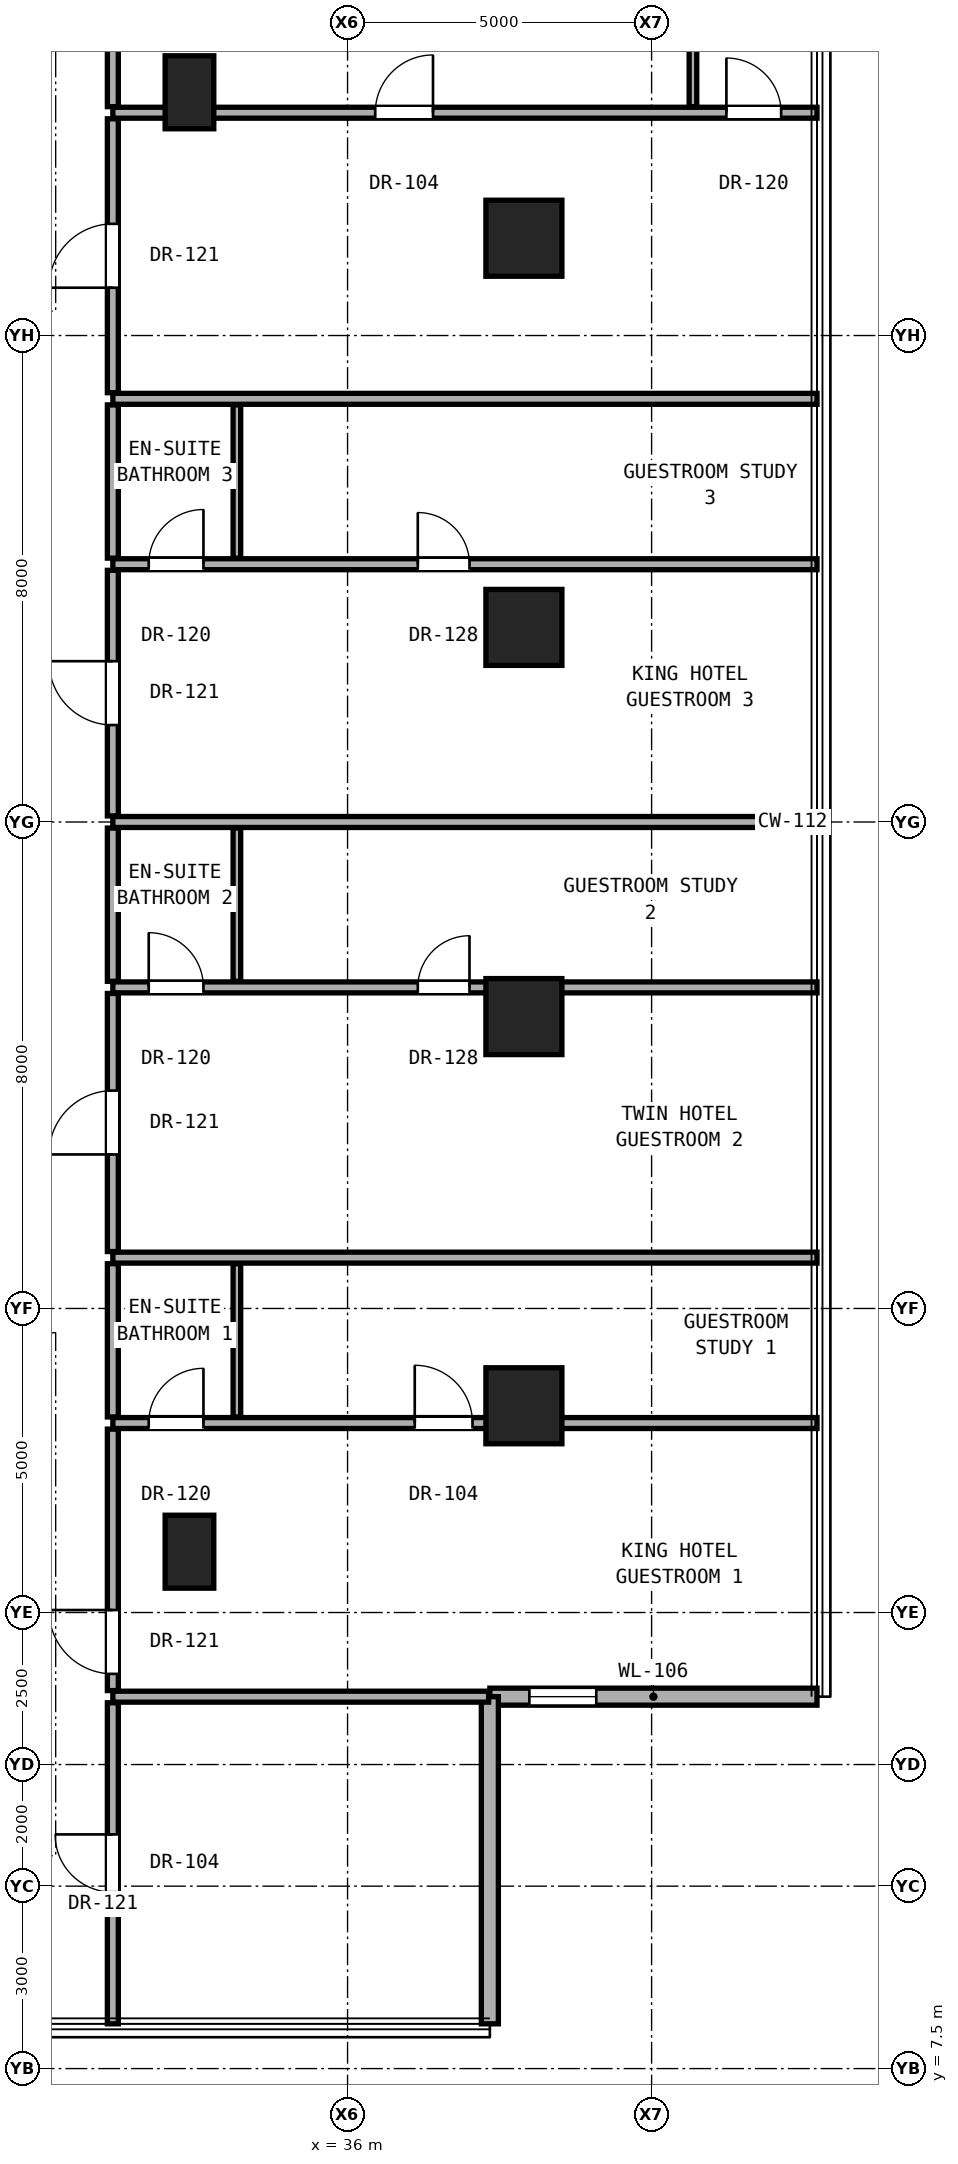
"""IFC4 building model, lengths in metres.
Left out: names, types, materials, properties, quantities, classifications, styles, units other than length and angle.
Written with IfcOpenShell. Run it as: python <this file> out.ifc"""

import sys

from ifc_helpers import new_model, si_unit, direction, frame, frame_2d, origin, origin_2d, place, context, subcontext, project, spatial, rectangle, hollow_rectangle, extrude, element, fill, save


model = new_model("IFC4")
c1 = context("Model", 3, precision=1e-05, world=origin(), true_north=direction((0.0, 1.0)))
c2 = subcontext(c1, "Body", "Model", "MODEL_VIEW")
j1 = project(units=[si_unit("LENGTHUNIT", "METRE"), si_unit("PLANEANGLEUNIT", "RADIAN")], contexts=[c1])
p1 = place(None, origin())
s1 = spatial("IfcSite", under=j1, at=p1, CompositionType="ELEMENT")
p2 = place(p1, origin())
s2 = spatial("IfcBuilding", under=s1, at=p2, CompositionType="ELEMENT")
p3 = place(p2, frame((0.0, 0.0, 48.8)))
s3 = spatial("IfcBuildingStorey", under=s2, at=p3, CompositionType="ELEMENT", Elevation=48.8)
for number, where, z_axis, x_axis in (
    (1, (38.9, 18.4, 0.0), (0.0, 0.0, 1.0), (1.0, 0.0, 0.0)),
    (2, (38.9, 24.8, 0.0), (0.0, 0.0, 1.0), (1.0, 0.0, 0.0)),
    (3, (38.9, 31.2, 0.0), (0.0, 0.0, 1.0), (1.0, 0.0, 0.0)),
    (4, (38.9, 37.6, 0.0), (0.0, 0.0, 1.0), (1.0, 0.0, 0.0)),
):
    element("IfcColumn", number, at=place(p3, frame(where, z_axis=z_axis, x_axis=x_axis)), inside=s3, PredefinedType="COLUMN", context=c2, shape_type="SweptSolid", body=[
        extrude(hollow_rectangle(XDim=1.25, YDim=1.25, WallThickness=0.07, at=origin_2d()), origin(), (0.0, 0.0, 1.0), 3.3),
    ])
for number, where, z_axis, x_axis in (
    (5, (33.4, 16.0, 0.0), (0.0, 0.0, 1.0), (1.0, 0.0, 0.0)),
    (6, (33.4, 40.0, 0.0), (0.0, 0.0, 1.0), (1.0, 0.0, 0.0)),
):
    element("IfcColumn", number, at=place(p3, frame(where, z_axis=z_axis, x_axis=x_axis)), inside=s3, PredefinedType="PILASTER", context=c2, shape_type="SweptSolid", body=[
        extrude(rectangle(XDim=0.8, YDim=1.2, at=origin_2d()), origin(), (0.0, 0.0, 1.0), 3.3),
    ])
p4 = place(p3, frame((38.34, 13.616, 0.0), z_axis=(0.0, 0.0, 1.0), x_axis=(1.0, 0.0, 0.0)))
e7 = element("IfcWall", 7, at=p4, inside=s3, PredefinedType="SOLIDWALL", context=c2, shape_type="SweptSolid", body=[
    extrude(rectangle(XDim=5.38, YDim=0.28, at=frame_2d((2.69, 0.0))), origin(), (0.0, 0.0, 1.0), 3.04),
])
p5 = place(p4, frame((0.65, 0.0, 0.85)))
e8 = element("IfcOpeningElement", 8, at=p5, cuts=e7, PredefinedType="OPENING", context=c2, shape_type="SweptSolid", body=[
    extrude(rectangle(XDim=1.1, YDim=2.0, at=frame_2d((0.55, 1.0))), frame((0.0, 0.15, 0.0), z_axis=(0.0, -1.0, 0.0), x_axis=(1.0, 0.0, 0.0)), (0.0, 0.0, 1.0), 0.3),
])
p6 = place(p3, frame((38.34, 8.236, 0.0), z_axis=(0.0, 0.0, 1.0), x_axis=(0.0, 1.0, 0.0)))
e9 = element("IfcWall", 9, at=p6, inside=s3, PredefinedType="SOLIDWALL", context=c2, shape_type="SweptSolid", body=[
    extrude(rectangle(XDim=5.38, YDim=0.28, at=frame_2d((2.69, 0.0))), origin(), (0.0, 0.0, 1.0), 3.04),
])
p7 = place(p3, frame((32.14, 13.616, 0.0), z_axis=(0.0, 0.0, 1.0), x_axis=(1.0, 0.0, 0.0)))
e10 = element("IfcWall", 10, at=p7, inside=s3, PredefinedType="PARTITIONING", context=c2, shape_type="SweptSolid", body=[
    extrude(rectangle(XDim=6.18, YDim=0.18, at=frame_2d((3.09, 0.0))), origin(), (0.0, 0.0, 1.0), 3.06),
])
p8 = place(p3, frame((32.14, 18.116, 0.0), z_axis=(0.0, 0.0, 1.0), x_axis=(1.0, 0.0, 0.0)))
e11 = element("IfcWall", 11, at=p8, inside=s3, PredefinedType="PARTITIONING", context=c2, shape_type="SweptSolid", body=[
    extrude(rectangle(XDim=11.58, YDim=0.18, at=frame_2d((5.79, 0.0))), origin(), (0.0, 0.0, 1.0), 2.436),
])
p9 = place(p8, frame((4.965, 0.0, 0.0)))
e12 = element("IfcOpeningElement", 12, at=p9, cuts=e11, PredefinedType="OPENING", context=c2, shape_type="SweptSolid", body=[
    extrude(rectangle(XDim=0.95, YDim=2.15, at=frame_2d((0.475, 1.075))), frame((0.0, 0.1, 0.0), z_axis=(0.0, -1.0, 0.0), x_axis=(1.0, 0.0, 0.0)), (0.0, 0.0, 1.0), 0.2),
])
p10 = place(p8, frame((0.59, 0.0, 0.0)))
e13 = element("IfcOpeningElement", 13, at=p10, cuts=e11, PredefinedType="OPENING", context=c2, shape_type="SweptSolid", body=[
    extrude(rectangle(XDim=0.9, YDim=2.1, at=frame_2d((0.45, 1.05))), frame((0.0, 0.1, 0.0), z_axis=(0.0, -1.0, 0.0), x_axis=(1.0, 0.0, 0.0)), (0.0, 0.0, 1.0), 0.2),
])
p11 = place(p3, frame((32.14, 20.836, 0.0), z_axis=(0.0, 0.0, 1.0), x_axis=(1.0, 0.0, 0.0)))
e14 = element("IfcWall", 14, at=p11, inside=s3, PredefinedType="PARTITIONING", context=c2, shape_type="SweptSolid", body=[
    extrude(rectangle(XDim=11.58, YDim=0.18, at=frame_2d((5.79, 0.0))), origin(), (0.0, 0.0, 1.0), 2.125),
])
p12 = place(p3, frame((32.14, 25.28, 0.0), z_axis=(0.0, 0.0, 1.0), x_axis=(1.0, 0.0, 0.0)))
e15 = element("IfcWall", 15, at=p12, inside=s3, PredefinedType="PARTITIONING", context=c2, shape_type="SweptSolid", body=[
    extrude(rectangle(XDim=11.58, YDim=0.18, at=frame_2d((5.79, 0.0))), origin(), (0.0, 0.0, 1.0), 2.125),
])
p13 = place(p12, frame((5.015, 0.0, 0.0)))
e16 = element("IfcOpeningElement", 16, at=p13, cuts=e15, PredefinedType="OPENING", context=c2, shape_type="SweptSolid", body=[
    extrude(rectangle(XDim=0.85, YDim=2.01, at=frame_2d((0.425, 1.005))), frame((0.0, 0.1, 0.0), z_axis=(0.0, -1.0, 0.0), x_axis=(1.0, 0.0, 0.0)), (0.0, 0.0, 1.0), 0.2),
])
p14 = place(p12, frame((0.59, 0.0, 0.0)))
e17 = element("IfcOpeningElement", 17, at=p14, cuts=e15, PredefinedType="OPENING", context=c2, shape_type="SweptSolid", body=[
    extrude(rectangle(XDim=0.9, YDim=2.1, at=frame_2d((0.45, 1.05))), frame((0.0, 0.1, 0.0), z_axis=(0.0, -1.0, 0.0), x_axis=(1.0, 0.0, 0.0)), (0.0, 0.0, 1.0), 0.2),
])
p15 = place(p3, frame((32.14, 28.0, 0.0), z_axis=(0.0, 0.0, 1.0), x_axis=(1.0, 0.0, 0.0)))
e18 = element("IfcWall", 18, at=p15, inside=s3, PredefinedType="PARTITIONING", context=c2, shape_type="SweptSolid", body=[
    extrude(rectangle(XDim=11.58, YDim=0.18, at=frame_2d((5.79, 0.0))), origin(), (0.0, 0.0, 1.0), 2.125),
])
p16 = place(p3, frame((32.14, 32.239, 0.0), z_axis=(0.0, 0.0, 1.0), x_axis=(1.0, 0.0, 0.0)))
e19 = element("IfcWall", 19, at=p16, inside=s3, PredefinedType="PARTITIONING", context=c2, shape_type="SweptSolid", body=[
    extrude(rectangle(XDim=11.58, YDim=0.18, at=frame_2d((5.79, 0.0))), origin(), (0.0, 0.0, 1.0), 2.125),
])
p17 = place(p16, frame((5.015, 0.0, 0.0)))
e20 = element("IfcOpeningElement", 20, at=p17, cuts=e19, PredefinedType="OPENING", context=c2, shape_type="SweptSolid", body=[
    extrude(rectangle(XDim=0.85, YDim=2.01, at=frame_2d((0.425, 1.005))), frame((0.0, 0.1, 0.0), z_axis=(0.0, -1.0, 0.0), x_axis=(1.0, 0.0, 0.0)), (0.0, 0.0, 1.0), 0.2),
])
p18 = place(p16, frame((0.59, 0.0, 0.0)))
e21 = element("IfcOpeningElement", 21, at=p18, cuts=e19, PredefinedType="OPENING", context=c2, shape_type="SweptSolid", body=[
    extrude(rectangle(XDim=0.9, YDim=2.1, at=frame_2d((0.45, 1.05))), frame((0.0, 0.1, 0.0), z_axis=(0.0, -1.0, 0.0), x_axis=(1.0, 0.0, 0.0)), (0.0, 0.0, 1.0), 0.2),
])
p19 = place(p3, frame((32.14, 34.959, 0.0), z_axis=(0.0, 0.0, 1.0), x_axis=(1.0, 0.0, 0.0)))
e22 = element("IfcWall", 22, at=p19, inside=s3, PredefinedType="PARTITIONING", context=c2, shape_type="SweptSolid", body=[
    extrude(rectangle(XDim=11.58, YDim=0.18, at=frame_2d((5.79, 0.0))), origin(), (0.0, 0.0, 1.0), 2.125),
])
p20 = place(p3, frame((32.14, 39.664, 0.0), z_axis=(0.0, 0.0, 1.0), x_axis=(1.0, 0.0, 0.0)))
e23 = element("IfcWall", 23, at=p20, inside=s3, PredefinedType="PARTITIONING", context=c2, shape_type="SweptSolid", body=[
    extrude(rectangle(XDim=11.58, YDim=0.18, at=frame_2d((5.79, 0.0))), origin(), (0.0, 0.0, 1.0), 2.436),
])
p21 = place(p20, frame((4.315, 0.0, 0.0)))
e24 = element("IfcOpeningElement", 24, at=p21, cuts=e23, PredefinedType="OPENING", context=c2, shape_type="SweptSolid", body=[
    extrude(rectangle(XDim=0.95, YDim=2.15, at=frame_2d((0.475, 1.075))), frame((0.0, 0.1, 0.0), z_axis=(0.0, -1.0, 0.0), x_axis=(1.0, 0.0, 0.0)), (0.0, 0.0, 1.0), 0.2),
])
p22 = place(p20, frame((10.09, 0.0, 0.0)))
e25 = element("IfcOpeningElement", 25, at=p22, cuts=e23, PredefinedType="OPENING", context=c2, shape_type="SweptSolid", body=[
    extrude(rectangle(XDim=0.9, YDim=2.1, at=frame_2d((0.45, 1.05))), frame((0.0, 0.1, 0.0), z_axis=(0.0, -1.0, 0.0), x_axis=(1.0, 0.0, 0.0)), (0.0, 0.0, 1.0), 0.2),
])
p23 = place(p3, frame((32.14, 8.236, 0.0), z_axis=(0.0, 0.0, 1.0), x_axis=(0.0, 1.0, 0.0)))
e26 = element("IfcWall", 26, at=p23, inside=s3, PredefinedType="PARTITIONING", context=c2, shape_type="SweptSolid", body=[
    extrude(rectangle(XDim=5.28, YDim=0.18, at=frame_2d((2.64, 0.0))), origin(), (0.0, 0.0, 1.0), 3.06),
])
p24 = place(p23, frame((2.165, 0.0, 0.0)))
e27 = element("IfcOpeningElement", 27, at=p24, cuts=e26, PredefinedType="OPENING", context=c2, shape_type="SweptSolid", body=[
    extrude(rectangle(XDim=0.95, YDim=2.15, at=frame_2d((0.475, 1.075))), frame((0.0, 0.1, 0.0), z_axis=(0.0, -1.0, 0.0), x_axis=(1.0, 0.0, 0.0)), (0.0, 0.0, 1.0), 0.2),
])
p25 = place(p3, frame((32.14, 13.716, 0.0), z_axis=(0.0, 0.0, 1.0), x_axis=(0.0, 1.0, 0.0)))
e28 = element("IfcWall", 28, at=p25, inside=s3, PredefinedType="PARTITIONING", context=c2, shape_type="SweptSolid", body=[
    extrude(rectangle(XDim=4.3, YDim=0.18, at=frame_2d((2.15, 0.0))), origin(), (0.0, 0.0, 1.0), 2.436),
])
p26 = place(p25, frame((0.275, 0.0, 0.0)))
e29 = element("IfcOpeningElement", 29, at=p26, cuts=e28, PredefinedType="OPENING", context=c2, shape_type="SweptSolid", body=[
    extrude(rectangle(XDim=1.05, YDim=2.2, at=frame_2d((0.525, 1.1))), frame((0.0, 0.1, 0.0), z_axis=(0.0, -1.0, 0.0), x_axis=(1.0, 0.0, 0.0)), (0.0, 0.0, 1.0), 0.2),
])
p27 = place(p3, frame((32.14, 18.216, 0.0), z_axis=(0.0, 0.0, 1.0), x_axis=(0.0, 1.0, 0.0)))
e30 = element("IfcWall", 30, at=p27, inside=s3, PredefinedType="PARTITIONING", context=c2, shape_type="SweptSolid", body=[
    extrude(rectangle(XDim=2.52, YDim=0.18, at=frame_2d((1.26, 0.0))), origin(), (0.0, 0.0, 1.0), 2.452),
])
p28 = place(p3, frame((32.14, 20.936, 0.0), z_axis=(0.0, 0.0, 1.0), x_axis=(0.0, 1.0, 0.0)))
e31 = element("IfcWall", 31, at=p28, inside=s3, PredefinedType="PARTITIONING", context=c2, shape_type="SweptSolid", body=[
    extrude(rectangle(XDim=4.244, YDim=0.18, at=frame_2d((2.122, 0.0))), origin(), (0.0, 0.0, 1.0), 2.279),
])
p29 = place(p28, frame((1.597, 0.0, 0.0)))
e32 = element("IfcOpeningElement", 32, at=p29, cuts=e31, PredefinedType="OPENING", context=c2, shape_type="SweptSolid", body=[
    extrude(rectangle(XDim=1.05, YDim=2.2, at=frame_2d((0.525, 1.1))), frame((0.0, 0.1, 0.0), z_axis=(0.0, -1.0, 0.0), x_axis=(1.0, 0.0, 0.0)), (0.0, 0.0, 1.0), 0.2),
])
p30 = place(p3, frame((32.14, 25.38, 0.0), z_axis=(0.0, 0.0, 1.0), x_axis=(0.0, 1.0, 0.0)))
e33 = element("IfcWall", 33, at=p30, inside=s3, PredefinedType="PARTITIONING", context=c2, shape_type="SweptSolid", body=[
    extrude(rectangle(XDim=2.52, YDim=0.18, at=frame_2d((1.26, 0.0))), origin(), (0.0, 0.0, 1.0), 3.06),
])
p31 = place(p3, frame((32.14, 28.1, 0.0), z_axis=(0.0, 0.0, 1.0), x_axis=(0.0, 1.0, 0.0)))
e34 = element("IfcWall", 34, at=p31, inside=s3, PredefinedType="PARTITIONING", context=c2, shape_type="SweptSolid", body=[
    extrude(rectangle(XDim=4.039, YDim=0.18, at=frame_2d((2.02, 0.0))), origin(), (0.0, 0.0, 1.0), 2.279),
])
p32 = place(p31, frame((1.494, 0.0, 0.0)))
e35 = element("IfcOpeningElement", 35, at=p32, cuts=e34, PredefinedType="OPENING", context=c2, shape_type="SweptSolid", body=[
    extrude(rectangle(XDim=1.05, YDim=2.2, at=frame_2d((0.525, 1.1))), frame((0.0, 0.1, 0.0), z_axis=(0.0, -1.0, 0.0), x_axis=(1.0, 0.0, 0.0)), (0.0, 0.0, 1.0), 0.2),
])
p33 = place(p3, frame((32.14, 32.339, 0.0), z_axis=(0.0, 0.0, 1.0), x_axis=(0.0, 1.0, 0.0)))
e36 = element("IfcWall", 36, at=p33, inside=s3, PredefinedType="PARTITIONING", context=c2, shape_type="SweptSolid", body=[
    extrude(rectangle(XDim=2.52, YDim=0.18, at=frame_2d((1.26, 0.0))), origin(), (0.0, 0.0, 1.0), 3.06),
])
p34 = place(p3, frame((32.14, 35.059, 0.0), z_axis=(0.0, 0.0, 1.0), x_axis=(0.0, 1.0, 0.0)))
e37 = element("IfcWall", 37, at=p34, inside=s3, PredefinedType="PARTITIONING", context=c2, shape_type="SweptSolid", body=[
    extrude(rectangle(XDim=4.505, YDim=0.18, at=frame_2d((2.252, 0.0))), origin(), (0.0, 0.0, 1.0), 2.436),
])
p35 = place(p34, frame((1.728, 0.0, 0.0)))
e38 = element("IfcOpeningElement", 38, at=p35, cuts=e37, PredefinedType="OPENING", context=c2, shape_type="SweptSolid", body=[
    extrude(rectangle(XDim=1.05, YDim=2.2, at=frame_2d((0.525, 1.1))), frame((0.0, 0.1, 0.0), z_axis=(0.0, -1.0, 0.0), x_axis=(1.0, 0.0, 0.0)), (0.0, 0.0, 1.0), 0.2),
])
p36 = place(p3, frame((32.14, 39.764, 0.0), z_axis=(0.0, 0.0, 1.0), x_axis=(0.0, 1.0, 0.0)))
e39 = element("IfcWall", 39, at=p36, inside=s3, PredefinedType="PARTITIONING", context=c2, shape_type="SweptSolid", body=[
    extrude(rectangle(XDim=2.535, YDim=0.18, at=frame_2d((1.268, 0.0))), origin(), (0.0, 0.0, 1.0), 3.06),
])
p37 = place(p3, frame((34.18, 18.216, 0.0), z_axis=(0.0, 0.0, 1.0), x_axis=(0.0, 1.0, 0.0)))
e40 = element("IfcWall", 40, at=p37, inside=s3, PredefinedType="PARTITIONING", context=c2, shape_type="SweptSolid", body=[
    extrude(rectangle(XDim=2.52, YDim=0.125, at=frame_2d((1.26, 0.0))), origin(), (0.0, 0.0, 1.0), 2.452),
])
p38 = place(p3, frame((34.18, 25.38, 0.0), z_axis=(0.0, 0.0, 1.0), x_axis=(0.0, 1.0, 0.0)))
e41 = element("IfcWall", 41, at=p38, inside=s3, PredefinedType="PARTITIONING", context=c2, shape_type="SweptSolid", body=[
    extrude(rectangle(XDim=2.52, YDim=0.125, at=frame_2d((1.26, 0.0))), origin(), (0.0, 0.0, 1.0), 3.06),
])
p39 = place(p3, frame((34.18, 32.339, 0.0), z_axis=(0.0, 0.0, 1.0), x_axis=(0.0, 1.0, 0.0)))
e42 = element("IfcWall", 42, at=p39, inside=s3, PredefinedType="PARTITIONING", context=c2, shape_type="SweptSolid", body=[
    extrude(rectangle(XDim=2.52, YDim=0.125, at=frame_2d((1.26, 0.0))), origin(), (0.0, 0.0, 1.0), 3.06),
])
p40 = place(p3, frame((41.68, 39.764, 0.0), z_axis=(0.0, 0.0, 1.0), x_axis=(0.0, 1.0, 0.0)))
e43 = element("IfcWall", 43, at=p40, inside=s3, PredefinedType="PARTITIONING", context=c2, shape_type="SweptSolid", body=[
    extrude(rectangle(XDim=2.62, YDim=0.125, at=frame_2d((1.31, 0.0))), origin(), (0.0, 0.0, 1.0), 3.06),
])
p41 = place(p5, origin())
e44 = element("IfcWindow", 44, at=p41, inside=s3, PartitioningType="SINGLE_PANEL", PredefinedType="WINDOW", context=c2, shape_type="SweptSolid", body=[
    extrude(rectangle(XDim=1.1, YDim=2.0, at=frame_2d((0.55, 1.0))), frame((0.0, 0.03, 0.0), z_axis=(0.0, -1.0, 0.0), x_axis=(1.0, 0.0, 0.0)), (0.0, 0.0, 1.0), 0.06),
])
fill(e8, e44)
p42 = place(p26, origin())
e45 = element("IfcDoor", 45, at=p42, inside=s3, OperationType="SINGLE_SWING_RIGHT", PredefinedType="DOOR", context=c2, shape_type="SweptSolid", body=[
    extrude(rectangle(XDim=1.05, YDim=2.2, at=frame_2d((0.525, 1.1))), frame((0.0, 0.025, 0.0), z_axis=(0.0, -1.0, 0.0), x_axis=(1.0, 0.0, 0.0)), (0.0, 0.0, 1.0), 0.05),
])
fill(e29, e45)
p43 = place(p9, origin())
e46 = element("IfcDoor", 46, at=p43, inside=s3, OperationType="SINGLE_SWING_LEFT", PredefinedType="DOOR", context=c2, shape_type="SweptSolid", body=[
    extrude(rectangle(XDim=0.95, YDim=2.15, at=frame_2d((0.475, 1.075))), frame((0.0, 0.025, 0.0), z_axis=(0.0, -1.0, 0.0), x_axis=(1.0, 0.0, 0.0)), (0.0, 0.0, 1.0), 0.05),
])
fill(e12, e46)
p44 = place(p10, origin())
e47 = element("IfcDoor", 47, at=p44, inside=s3, OperationType="SINGLE_SWING_RIGHT", PredefinedType="DOOR", context=c2, shape_type="SweptSolid", body=[
    extrude(rectangle(XDim=0.9, YDim=2.1, at=frame_2d((0.45, 1.05))), frame((0.0, 0.025, 0.0), z_axis=(0.0, -1.0, 0.0), x_axis=(1.0, 0.0, 0.0)), (0.0, 0.0, 1.0), 0.05),
])
fill(e13, e47)
p45 = place(p29, origin())
e48 = element("IfcDoor", 48, at=p45, inside=s3, OperationType="SINGLE_SWING_LEFT", PredefinedType="DOOR", context=c2, shape_type="SweptSolid", body=[
    extrude(rectangle(XDim=1.05, YDim=2.2, at=frame_2d((0.525, 1.1))), frame((0.0, 0.025, 0.0), z_axis=(0.0, -1.0, 0.0), x_axis=(1.0, 0.0, 0.0)), (0.0, 0.0, 1.0), 0.05),
])
fill(e32, e48)
p46 = place(p13, origin())
e49 = element("IfcDoor", 49, at=p46, inside=s3, OperationType="SINGLE_SWING_RIGHT", PredefinedType="DOOR", context=c2, shape_type="SweptSolid", body=[
    extrude(rectangle(XDim=0.85, YDim=2.01, at=frame_2d((0.425, 1.005))), frame((0.0, 0.025, 0.0), z_axis=(0.0, -1.0, 0.0), x_axis=(1.0, 0.0, 0.0)), (0.0, 0.0, 1.0), 0.05),
])
fill(e16, e49)
p47 = place(p14, origin())
e50 = element("IfcDoor", 50, at=p47, inside=s3, OperationType="SINGLE_SWING_LEFT", PredefinedType="DOOR", context=c2, shape_type="SweptSolid", body=[
    extrude(rectangle(XDim=0.9, YDim=2.1, at=frame_2d((0.45, 1.05))), frame((0.0, 0.025, 0.0), z_axis=(0.0, -1.0, 0.0), x_axis=(1.0, 0.0, 0.0)), (0.0, 0.0, 1.0), 0.05),
])
fill(e17, e50)
p48 = place(p32, origin())
e51 = element("IfcDoor", 51, at=p48, inside=s3, OperationType="SINGLE_SWING_RIGHT", PredefinedType="DOOR", context=c2, shape_type="SweptSolid", body=[
    extrude(rectangle(XDim=1.05, YDim=2.2, at=frame_2d((0.525, 1.1))), frame((0.0, 0.025, 0.0), z_axis=(0.0, -1.0, 0.0), x_axis=(1.0, 0.0, 0.0)), (0.0, 0.0, 1.0), 0.05),
])
fill(e35, e51)
p49 = place(p17, origin())
e52 = element("IfcDoor", 52, at=p49, inside=s3, OperationType="SINGLE_SWING_LEFT", PredefinedType="DOOR", context=c2, shape_type="SweptSolid", body=[
    extrude(rectangle(XDim=0.85, YDim=2.01, at=frame_2d((0.425, 1.005))), frame((0.0, 0.025, 0.0), z_axis=(0.0, -1.0, 0.0), x_axis=(1.0, 0.0, 0.0)), (0.0, 0.0, 1.0), 0.05),
])
fill(e20, e52)
p50 = place(p18, origin())
e53 = element("IfcDoor", 53, at=p50, inside=s3, OperationType="SINGLE_SWING_RIGHT", PredefinedType="DOOR", context=c2, shape_type="SweptSolid", body=[
    extrude(rectangle(XDim=0.9, YDim=2.1, at=frame_2d((0.45, 1.05))), frame((0.0, 0.025, 0.0), z_axis=(0.0, -1.0, 0.0), x_axis=(1.0, 0.0, 0.0)), (0.0, 0.0, 1.0), 0.05),
])
fill(e21, e53)
p51 = place(p35, origin())
e54 = element("IfcDoor", 54, at=p51, inside=s3, OperationType="SINGLE_SWING_LEFT", PredefinedType="DOOR", context=c2, shape_type="SweptSolid", body=[
    extrude(rectangle(XDim=1.05, YDim=2.2, at=frame_2d((0.525, 1.1))), frame((0.0, 0.025, 0.0), z_axis=(0.0, -1.0, 0.0), x_axis=(1.0, 0.0, 0.0)), (0.0, 0.0, 1.0), 0.05),
])
fill(e38, e54)
p52 = place(p21, origin())
e55 = element("IfcDoor", 55, at=p52, inside=s3, OperationType="SINGLE_SWING_RIGHT", PredefinedType="DOOR", context=c2, shape_type="SweptSolid", body=[
    extrude(rectangle(XDim=0.95, YDim=2.15, at=frame_2d((0.475, 1.075))), frame((0.0, 0.025, 0.0), z_axis=(0.0, -1.0, 0.0), x_axis=(1.0, 0.0, 0.0)), (0.0, 0.0, 1.0), 0.05),
])
fill(e24, e55)
p53 = place(p22, origin())
e56 = element("IfcDoor", 56, at=p53, inside=s3, OperationType="SINGLE_SWING_LEFT", PredefinedType="DOOR", context=c2, shape_type="SweptSolid", body=[
    extrude(rectangle(XDim=0.9, YDim=2.1, at=frame_2d((0.45, 1.05))), frame((0.0, 0.025, 0.0), z_axis=(0.0, -1.0, 0.0), x_axis=(1.0, 0.0, 0.0)), (0.0, 0.0, 1.0), 0.05),
])
fill(e25, e56)
p54 = place(p24, origin())
e57 = element("IfcDoor", 57, at=p54, inside=s3, OperationType="SINGLE_SWING_RIGHT", PredefinedType="DOOR", context=c2, shape_type="SweptSolid", body=[
    extrude(rectangle(XDim=0.95, YDim=2.15, at=frame_2d((0.475, 1.075))), frame((0.0, 0.025, 0.0), z_axis=(0.0, -1.0, 0.0), x_axis=(1.0, 0.0, 0.0)), (0.0, 0.0, 1.0), 0.05),
])
fill(e27, e57)
save(model, sys.argv[1])
